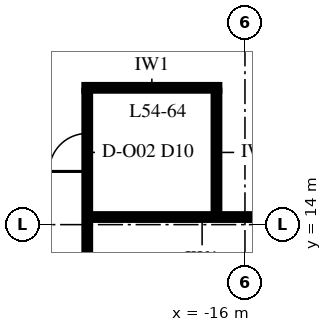
"""IFC4 building model, lengths in metres.
Left out: names, types, materials, properties, quantities, classifications, styles, units other than length and angle.
Written with IfcOpenShell. Run it as: python <this file> out.ifc"""

import sys

from ifc_helpers import new_model, si_unit, direction, frame, frame_2d, origin, place, context, subcontext, project, spatial, rectangle, extrude, element, fill, save


model = new_model("IFC4")
c1 = context("Model", 3, precision=1e-05, world=origin(), true_north=direction((0.0, 1.0)))
c2 = subcontext(c1, "Body", "Model", "MODEL_VIEW")
j1 = project(units=[si_unit("LENGTHUNIT", "METRE"), si_unit("PLANEANGLEUNIT", "RADIAN")], contexts=[c1])
p1 = place(None, origin())
s1 = spatial("IfcSite", under=j1, at=p1, CompositionType="ELEMENT")
p2 = place(p1, origin())
s2 = spatial("IfcBuilding", under=s1, at=p2, CompositionType="ELEMENT")
p3 = place(p2, frame((0.0, 0.0, 234.0)))
s3 = spatial("IfcBuildingStorey", under=s2, at=p3, CompositionType="ELEMENT", Elevation=234.0)
p4 = place(p3, frame((-20.075, 14.2, 0.0), z_axis=(0.0, 0.0, 1.0), x_axis=(1.0, 0.0, 0.0)))
e1 = element("IfcWall", 1, at=p4, inside=s3, PredefinedType="PARTITIONING", context=c2, shape_type="SweptSolid", body=[
    extrude(rectangle(XDim=5.895, YDim=0.15, at=frame_2d((2.948, 0.0))), origin(), (0.0, 0.0, 1.0), 3.25),
])
p5 = place(p3, frame((-20.225, 17.6, 0.0), z_axis=(0.0, 0.0, 1.0), x_axis=(1.0, 0.0, 0.0)))
e2 = element("IfcWall", 2, at=p5, inside=s3, PredefinedType="PARTITIONING", context=c2, shape_type="SweptSolid", body=[
    extrude(rectangle(XDim=3.55, YDim=0.15, at=frame_2d((1.775, 0.0))), origin(), (0.0, 0.0, 1.0), 3.85),
])
p6 = place(p3, frame((-20.15, 8.275, 0.0), z_axis=(0.0, 0.0, 1.0), x_axis=(0.0, 1.0, 0.0)))
e3 = element("IfcWall", 3, at=p6, inside=s3, PredefinedType="PARTITIONING", context=c2, shape_type="SweptSolid", body=[
    extrude(rectangle(XDim=9.25, YDim=0.15, at=frame_2d((4.625, 0.0))), origin(), (0.0, 0.0, 1.0), 3.25),
])
p7 = place(p6, frame((2.425, 0.0, 0.0)))
e4 = element("IfcOpeningElement", 4, at=p7, cuts=e3, PredefinedType="OPENING", context=c2, shape_type="SweptSolid", body=[
    extrude(rectangle(XDim=1.0, YDim=2.3, at=frame_2d((0.5, 1.15))), frame((0.0, 0.09, 0.0), z_axis=(0.0, -1.0, 0.0), x_axis=(1.0, 0.0, 0.0)), (0.0, 0.0, 1.0), 0.18),
])
p8 = place(p6, frame((7.125, 0.0, 0.0)))
e5 = element("IfcOpeningElement", 5, at=p8, cuts=e3, PredefinedType="OPENING", context=c2, shape_type="SweptSolid", body=[
    extrude(rectangle(XDim=1.0, YDim=2.3, at=frame_2d((0.5, 1.15))), frame((0.0, 0.09, 0.0), z_axis=(0.0, -1.0, 0.0), x_axis=(1.0, 0.0, 0.0)), (0.0, 0.0, 1.0), 0.18),
])
p9 = place(p3, frame((-16.75, 14.275, 0.0), z_axis=(0.0, 0.0, 1.0), x_axis=(0.0, 1.0, 0.0)))
e6 = element("IfcWall", 6, at=p9, inside=s3, PredefinedType="PARTITIONING", context=c2, shape_type="SweptSolid", body=[
    extrude(rectangle(XDim=3.25, YDim=0.15, at=frame_2d((1.625, 0.0))), origin(), (0.0, 0.0, 1.0), 3.25),
])
p10 = place(p8, origin())
e7 = element("IfcDoor", 7, at=p10, inside=s3, OperationType="SINGLE_SWING_LEFT", PredefinedType="DOOR", context=c2, shape_type="SweptSolid", body=[
    extrude(rectangle(XDim=1.0, YDim=2.3, at=frame_2d((0.5, 1.15))), frame((0.0, 0.075, 0.0), z_axis=(0.0, -1.0, 0.0), x_axis=(1.0, 0.0, 0.0)), (0.0, 0.0, 1.0), 0.149),
])
fill(e5, e7)
save(model, sys.argv[1])
